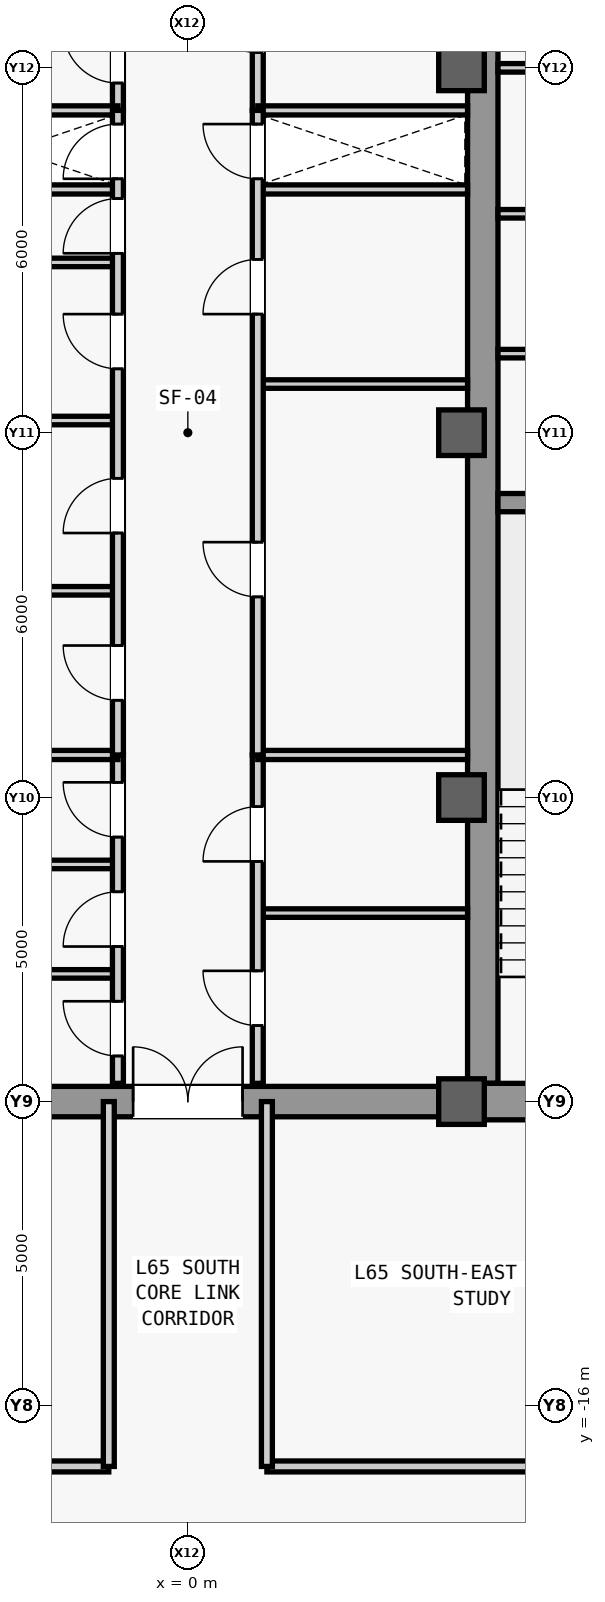
"""IFC4 building model, lengths in metres.
Left out: names, types, materials, properties, quantities, classifications, styles, units other than length and angle.
Written with IfcOpenShell. Run it as: python <this file> out.ifc"""

import sys

from ifc_helpers import new_model, si_unit, direction, frame, frame_2d, origin, origin_2d, place, context, subcontext, project, spatial, rectangle, extrude, source, transform, mapped, element, fill, save


model = new_model("IFC4")
c1 = context("Model", 3, precision=1e-05, world=origin(), true_north=direction((0.0, 1.0)))
c2 = subcontext(c1, "Body", "Model", "MODEL_VIEW")
j1 = project(units=[si_unit("LENGTHUNIT", "METRE"), si_unit("PLANEANGLEUNIT", "RADIAN")], contexts=[c1])
p1 = place(None, origin())
s1 = spatial("IfcSite", under=j1, at=p1, CompositionType="ELEMENT")
p2 = place(p1, origin())
s2 = spatial("IfcBuilding", under=s1, at=p2, CompositionType="ELEMENT")
p3 = place(p2, frame((0.0, 0.0, 277.5)))
s3 = spatial("IfcBuildingStorey", under=s2, at=p3, CompositionType="ELEMENT", Elevation=277.5)
m1 = source(origin(), c2, "Body", "SweptSolid", [
    extrude(rectangle(XDim=21.4, YDim=0.5, at=frame_2d((10.7, 0.0))), origin(), (0.0, 0.0, 1.0), 3.78),
])
p4 = place(p3, frame((4.85, -10.7, 0.0), z_axis=(0.0, 0.0, 1.0), x_axis=(0.0, 1.0, 0.0)))
e1 = element("IfcWall", 1, at=p4, inside=s3, PredefinedType="SHEAR", context=c2, shape_type="MappedRepresentation", body=[
    mapped(m1, transform((0.0, 0.0, 0.0), scale=1.0)),
])
m2 = source(origin(), c2, "Body", "SweptSolid", [
    extrude(rectangle(XDim=5.9, YDim=0.6, at=frame_2d((2.95, 0.0))), origin(), (0.0, 0.0, 1.0), 3.78),
])
p5 = place(p3, frame((4.85, -11.0, 0.0), z_axis=(0.0, 0.0, 1.0), x_axis=(1.0, 0.0, 0.0)))
e2 = element("IfcWall", 2, at=p5, inside=s3, PredefinedType="SHEAR", context=c2, shape_type="MappedRepresentation", body=[
    mapped(m2, transform((0.0, 0.0, 0.0), scale=1.0)),
])
m3 = source(origin(), c2, "Body", "SweptSolid", [
    extrude(rectangle(XDim=5.65, YDim=0.3, at=frame_2d((2.825, 0.0))), origin(), (0.0, 0.0, 1.0), 3.78),
])
p6 = place(p3, frame((5.1, -1.15, 0.0), z_axis=(0.0, 0.0, 1.0), x_axis=(1.0, 0.0, 0.0)))
e3 = element("IfcWall", 3, at=p6, inside=s3, PredefinedType="SHEAR", context=c2, shape_type="MappedRepresentation", body=[
    mapped(m3, transform((0.0, 0.0, 0.0), scale=1.0)),
])
m4 = source(origin(), c2, "Body", "SweptSolid", [
    extrude(rectangle(XDim=9.2, YDim=0.5, at=frame_2d((4.6, 0.0))), origin(), (0.0, 0.0, 1.0), 3.78),
])
p7 = place(p3, frame((-4.6, -11.0, 0.0), z_axis=(0.0, 0.0, 1.0), x_axis=(1.0, 0.0, 0.0)))
e4 = element("IfcWall", 4, at=p7, inside=s3, PredefinedType="SHEAR", context=c2, shape_type="MappedRepresentation", body=[
    mapped(m4, transform((0.0, 0.0, 0.0), scale=1.0)),
])
m5 = source(origin(), c2, "Body", "SweptSolid", [
    extrude(rectangle(XDim=1.8, YDim=2.25, at=frame_2d((0.9, 1.125))), frame((0.0, 0.26, 0.0), z_axis=(0.0, -1.0, 0.0), x_axis=(1.0, 0.0, 0.0)), (0.0, 0.0, 1.0), 0.52),
])
p8 = place(p7, frame((3.7, 0.0, 0.0)))
e5 = element("IfcOpeningElement", 5, at=p8, cuts=e4, PredefinedType="OPENING", context=c2, shape_type="MappedRepresentation", body=[
    mapped(m5, transform((0.0, 0.0, 0.0), scale=1.0)),
])
m6 = source(origin(), c2, "Body", "SweptSolid", [
    extrude(rectangle(XDim=0.75, YDim=0.75, at=origin_2d()), origin(), (0.0, 0.0, 1.0), 4.0),
])
for number, where, z_axis, x_axis in (
    (6, (4.5, -11.0, 0.0), (0.0, 0.0, 1.0), (1.0, 0.0, 0.0)),
    (7, (4.5, -6.0, 0.0), (0.0, 0.0, 1.0), (1.0, 0.0, 0.0)),
    (8, (4.5, 0.0, 0.0), (0.0, 0.0, 1.0), (1.0, 0.0, 0.0)),
    (9, (4.5, 6.0, 0.0), (0.0, 0.0, 1.0), (1.0, 0.0, 0.0)),
):
    element("IfcColumn", number, at=place(p3, frame(where, z_axis=z_axis, x_axis=x_axis)), inside=s3, PredefinedType="COLUMN", context=c2, shape_type="MappedRepresentation", body=[
        mapped(m6, transform((0.0, 0.0, 0.0), scale=1.0)),
    ])
m7 = source(origin(), c2, "Body", "SweptSolid", [
    extrude(rectangle(XDim=3.15, YDim=0.14, at=frame_2d((1.575, 0.0))), origin(), (0.0, 0.0, 1.0), 3.78),
])
p9 = place(p3, frame((5.1, 1.3, 0.0), z_axis=(0.0, 0.0, 1.0), x_axis=(1.0, 0.0, 0.0)))
e10 = element("IfcWall", 10, at=p9, inside=s3, PredefinedType="PARTITIONING", context=c2, shape_type="MappedRepresentation", body=[
    mapped(m7, transform((0.0, 0.0, 0.0), scale=1.0)),
])
p10 = place(p3, frame((5.1, 6.0, 0.0), z_axis=(0.0, 0.0, 1.0), x_axis=(1.0, 0.0, 0.0)))
e11 = element("IfcWall", 11, at=p10, inside=s3, PredefinedType="PARTITIONING", context=c2, shape_type="MappedRepresentation", body=[
    mapped(m7, transform((0.0, 0.0, 0.0), scale=1.0)),
])
m8 = source(origin(), c2, "Body", "SweptSolid", [
    extrude(rectangle(XDim=0.9, YDim=2.15, at=frame_2d((0.45, 1.075))), frame((0.0, 0.08, 0.0), z_axis=(0.0, -1.0, 0.0), x_axis=(1.0, 0.0, 0.0)), (0.0, 0.0, 1.0), 0.16),
])
p11 = place(p10, frame((1.13, 0.0, 0.0)))
e12 = element("IfcOpeningElement", 12, at=p11, cuts=e11, PredefinedType="OPENING", context=c2, shape_type="MappedRepresentation", body=[
    mapped(m8, transform((0.0, 0.0, 0.0), scale=1.0)),
])
p12 = place(p3, frame((5.1, 3.6, 0.0), z_axis=(0.0, 0.0, 1.0), x_axis=(1.0, 0.0, 0.0)))
e13 = element("IfcWall", 13, at=p12, inside=s3, PredefinedType="PARTITIONING", context=c2, shape_type="MappedRepresentation", body=[
    mapped(m7, transform((0.0, 0.0, 0.0), scale=1.0)),
])
p13 = place(p12, frame((1.13, 0.0, 0.0)))
e14 = element("IfcOpeningElement", 14, at=p13, cuts=e13, PredefinedType="OPENING", context=c2, shape_type="MappedRepresentation", body=[
    mapped(m8, transform((0.0, 0.0, 0.0), scale=1.0)),
])
m9 = source(origin(), c2, "Body", "SweptSolid", [
    extrude(rectangle(XDim=3.45, YDim=0.15, at=frame_2d((1.725, 0.0))), origin(), (0.0, 0.0, 1.0), 3.78),
])
for number, where, z_axis, x_axis in (
    (15, (-4.6, 4.0, 0.0), (0.0, 0.0, 1.0), (1.0, 0.0, 0.0)),
    (16, (1.15, 4.0, 0.0), (0.0, 0.0, 1.0), (1.0, 0.0, 0.0)),
):
    element("IfcWall", number, at=place(p3, frame(where, z_axis=z_axis, x_axis=x_axis)), inside=s3, PredefinedType="PARTITIONING", context=c2, shape_type="MappedRepresentation", body=[
        mapped(m9, transform((0.0, 0.0, 0.0), scale=1.0)),
    ])
m10 = source(origin(), c2, "Body", "SweptSolid", [
    extrude(rectangle(XDim=3.45, YDim=0.14, at=frame_2d((1.725, 0.0))), origin(), (0.0, 0.0, 1.0), 3.78),
])
for number, where, z_axis, x_axis in (
    (17, (-4.6, -8.9, 0.0), (0.0, 0.0, 1.0), (1.0, 0.0, 0.0)),
    (18, (-4.6, -7.1, 0.0), (0.0, 0.0, 1.0), (1.0, 0.0, 0.0)),
):
    element("IfcWall", number, at=place(p3, frame(where, z_axis=z_axis, x_axis=x_axis)), inside=s3, PredefinedType="PARTITIONING", context=c2, shape_type="MappedRepresentation", body=[
        mapped(m10, transform((0.0, 0.0, 0.0), scale=1.0)),
    ])
m11 = source(origin(), c2, "Body", "SweptSolid", [
    extrude(rectangle(XDim=5.4, YDim=0.18, at=frame_2d((2.7, 0.0))), origin(), (0.0, 0.0, 1.0), 3.78),
])
p14 = place(p3, frame((-1.15, -10.7, 0.0), z_axis=(0.0, 0.0, 1.0), x_axis=(0.0, 1.0, 0.0)))
e19 = element("IfcWall", 19, at=p14, inside=s3, PredefinedType="PARTITIONING", context=c2, shape_type="MappedRepresentation", body=[
    mapped(m11, transform((0.0, 0.0, 0.0), scale=1.0)),
])
m12 = source(origin(), c2, "Body", "SweptSolid", [
    extrude(rectangle(XDim=0.9, YDim=2.15, at=frame_2d((0.45, 1.075))), frame((0.0, 0.1, 0.0), z_axis=(0.0, -1.0, 0.0), x_axis=(1.0, 0.0, 0.0)), (0.0, 0.0, 1.0), 0.2),
])
p15 = place(p14, frame((0.45, 0.0, 0.0)))
e20 = element("IfcOpeningElement", 20, at=p15, cuts=e19, PredefinedType="OPENING", context=c2, shape_type="MappedRepresentation", body=[
    mapped(m12, transform((0.0, 0.0, 0.0), scale=1.0)),
])
p16 = place(p14, frame((2.25, 0.0, 0.0)))
e21 = element("IfcOpeningElement", 21, at=p16, cuts=e19, PredefinedType="OPENING", context=c2, shape_type="MappedRepresentation", body=[
    mapped(m12, transform((0.0, 0.0, 0.0), scale=1.0)),
])
p17 = place(p14, frame((4.05, 0.0, 0.0)))
e22 = element("IfcOpeningElement", 22, at=p17, cuts=e19, PredefinedType="OPENING", context=c2, shape_type="MappedRepresentation", body=[
    mapped(m12, transform((0.0, 0.0, 0.0), scale=1.0)),
])
p18 = place(p3, frame((1.15, -7.9, 0.0), z_axis=(0.0, 0.0, 1.0), x_axis=(1.0, 0.0, 0.0)))
e23 = element("IfcWall", 23, at=p18, inside=s3, PredefinedType="PARTITIONING", context=c2, shape_type="MappedRepresentation", body=[
    mapped(m10, transform((0.0, 0.0, 0.0), scale=1.0)),
])
p19 = place(p3, frame((1.15, -10.7, 0.0), z_axis=(0.0, 0.0, 1.0), x_axis=(0.0, 1.0, 0.0)))
e24 = element("IfcWall", 24, at=p19, inside=s3, PredefinedType="PARTITIONING", context=c2, shape_type="MappedRepresentation", body=[
    mapped(m11, transform((0.0, 0.0, 0.0), scale=1.0)),
])
p20 = place(p19, frame((0.95, 0.0, 0.0)))
e25 = element("IfcOpeningElement", 25, at=p20, cuts=e24, PredefinedType="OPENING", context=c2, shape_type="MappedRepresentation", body=[
    mapped(m12, transform((0.0, 0.0, 0.0), scale=1.0)),
])
p21 = place(p19, frame((3.65, 0.0, 0.0)))
e26 = element("IfcOpeningElement", 26, at=p21, cuts=e24, PredefinedType="OPENING", context=c2, shape_type="MappedRepresentation", body=[
    mapped(m12, transform((0.0, 0.0, 0.0), scale=1.0)),
])
for number, where, z_axis, x_axis in (
    (27, (-4.6, -5.3, 0.0), (0.0, 0.0, 1.0), (1.0, 0.0, 0.0)),
    (28, (1.15, -5.3, 0.0), (0.0, 0.0, 1.0), (1.0, 0.0, 0.0)),
):
    element("IfcWall", number, at=place(p3, frame(where, z_axis=z_axis, x_axis=x_axis)), inside=s3, PredefinedType="PARTITIONING", context=c2, shape_type="MappedRepresentation", body=[
        mapped(m9, transform((0.0, 0.0, 0.0), scale=1.0)),
    ])
p22 = place(p3, frame((-1.15, 5.3, 0.0), z_axis=(0.0, 0.0, 1.0), x_axis=(0.0, 1.0, 0.0)))
e29 = element("IfcWall", 29, at=p22, inside=s3, PredefinedType="PARTITIONING", context=c2, shape_type="MappedRepresentation", body=[
    mapped(m11, transform((0.0, 0.0, 0.0), scale=1.0)),
])
p23 = place(p22, frame((0.45, 0.0, 0.0)))
e30 = element("IfcOpeningElement", 30, at=p23, cuts=e29, PredefinedType="OPENING", context=c2, shape_type="MappedRepresentation", body=[
    mapped(m12, transform((0.0, 0.0, 0.0), scale=1.0)),
])
p24 = place(p22, frame((2.25, 0.0, 0.0)))
e31 = element("IfcOpeningElement", 31, at=p24, cuts=e29, PredefinedType="OPENING", context=c2, shape_type="MappedRepresentation", body=[
    mapped(m12, transform((0.0, 0.0, 0.0), scale=1.0)),
])
p25 = place(p22, frame((4.05, 0.0, 0.0)))
e32 = element("IfcOpeningElement", 32, at=p25, cuts=e29, PredefinedType="OPENING", context=c2, shape_type="MappedRepresentation", body=[
    mapped(m12, transform((0.0, 0.0, 0.0), scale=1.0)),
])
p26 = place(p3, frame((1.15, 5.3, 0.0), z_axis=(0.0, 0.0, 1.0), x_axis=(0.0, 1.0, 0.0)))
e33 = element("IfcWall", 33, at=p26, inside=s3, PredefinedType="PARTITIONING", context=c2, shape_type="MappedRepresentation", body=[
    mapped(m11, transform((0.0, 0.0, 0.0), scale=1.0)),
])
p27 = place(p26, frame((0.95, 0.0, 0.0)))
e34 = element("IfcOpeningElement", 34, at=p27, cuts=e33, PredefinedType="OPENING", context=c2, shape_type="MappedRepresentation", body=[
    mapped(m12, transform((0.0, 0.0, 0.0), scale=1.0)),
])
p28 = place(p26, frame((3.65, 0.0, 0.0)))
e35 = element("IfcOpeningElement", 35, at=p28, cuts=e33, PredefinedType="OPENING", context=c2, shape_type="MappedRepresentation", body=[
    mapped(m12, transform((0.0, 0.0, 0.0), scale=1.0)),
])
for number, where, z_axis, x_axis in (
    (36, (-4.6, 5.3, 0.0), (0.0, 0.0, 1.0), (1.0, 0.0, 0.0)),
    (37, (1.15, 5.3, 0.0), (0.0, 0.0, 1.0), (1.0, 0.0, 0.0)),
):
    element("IfcWall", number, at=place(p3, frame(where, z_axis=z_axis, x_axis=x_axis)), inside=s3, PredefinedType="PARTITIONING", context=c2, shape_type="MappedRepresentation", body=[
        mapped(m9, transform((0.0, 0.0, 0.0), scale=1.0)),
    ])
p29 = place(p3, frame((-4.6, -2.6, 0.0), z_axis=(0.0, 0.0, 1.0), x_axis=(1.0, 0.0, 0.0)))
e38 = element("IfcWall", 38, at=p29, inside=s3, PredefinedType="PARTITIONING", context=c2, shape_type="MappedRepresentation", body=[
    mapped(m10, transform((0.0, 0.0, 0.0), scale=1.0)),
])
m13 = source(origin(), c2, "Body", "SweptSolid", [
    extrude(rectangle(XDim=3.45, YDim=0.14, at=frame_2d((1.725, 0.0))), origin(), (0.0, 0.0, 1.0), 3.085),
])
p30 = place(p3, frame((-4.6, 0.2, 0.0), z_axis=(0.0, 0.0, 1.0), x_axis=(1.0, 0.0, 0.0)))
e39 = element("IfcWall", 39, at=p30, inside=s3, PredefinedType="PARTITIONING", context=c2, shape_type="MappedRepresentation", body=[
    mapped(m13, transform((0.0, 0.0, 0.0), scale=1.0)),
])
p31 = place(p3, frame((-4.6, 2.8, 0.0), z_axis=(0.0, 0.0, 1.0), x_axis=(1.0, 0.0, 0.0)))
e40 = element("IfcWall", 40, at=p31, inside=s3, PredefinedType="PARTITIONING", context=c2, shape_type="MappedRepresentation", body=[
    mapped(m10, transform((0.0, 0.0, 0.0), scale=1.0)),
])
m14 = source(origin(), c2, "Body", "SweptSolid", [
    extrude(rectangle(XDim=10.6, YDim=0.18, at=frame_2d((5.3, 0.0))), origin(), (0.0, 0.0, 1.0), 3.78),
])
p32 = place(p3, frame((-1.15, -5.3, 0.0), z_axis=(0.0, 0.0, 1.0), x_axis=(0.0, 1.0, 0.0)))
e41 = element("IfcWall", 41, at=p32, inside=s3, PredefinedType="PARTITIONING", context=c2, shape_type="MappedRepresentation", body=[
    mapped(m14, transform((0.0, 0.0, 0.0), scale=1.0)),
])
p33 = place(p32, frame((0.9, 0.0, 0.0)))
e42 = element("IfcOpeningElement", 42, at=p33, cuts=e41, PredefinedType="OPENING", context=c2, shape_type="MappedRepresentation", body=[
    mapped(m12, transform((0.0, 0.0, 0.0), scale=1.0)),
])
p34 = place(p32, frame((3.65, 0.0, 0.0)))
e43 = element("IfcOpeningElement", 43, at=p34, cuts=e41, PredefinedType="OPENING", context=c2, shape_type="MappedRepresentation", body=[
    mapped(m12, transform((0.0, 0.0, 0.0), scale=1.0)),
])
p35 = place(p32, frame((6.35, 0.0, 0.0)))
e44 = element("IfcOpeningElement", 44, at=p35, cuts=e41, PredefinedType="OPENING", context=c2, shape_type="MappedRepresentation", body=[
    mapped(m12, transform((0.0, 0.0, 0.0), scale=1.0)),
])
p36 = place(p32, frame((8.25, 0.0, 0.0)))
e45 = element("IfcOpeningElement", 45, at=p36, cuts=e41, PredefinedType="OPENING", context=c2, shape_type="MappedRepresentation", body=[
    mapped(m12, transform((0.0, 0.0, 0.0), scale=1.0)),
])
p37 = place(p32, frame((9.475, 0.0, 0.0)))
e46 = element("IfcOpeningElement", 46, at=p37, cuts=e41, PredefinedType="OPENING", context=c2, shape_type="MappedRepresentation", body=[
    mapped(m12, transform((0.0, 0.0, 0.0), scale=1.0)),
])
p38 = place(p3, frame((1.15, 0.8, 0.0), z_axis=(0.0, 0.0, 1.0), x_axis=(1.0, 0.0, 0.0)))
e47 = element("IfcWall", 47, at=p38, inside=s3, PredefinedType="PARTITIONING", context=c2, shape_type="MappedRepresentation", body=[
    mapped(m10, transform((0.0, 0.0, 0.0), scale=1.0)),
])
p39 = place(p3, frame((1.15, -5.3, 0.0), z_axis=(0.0, 0.0, 1.0), x_axis=(0.0, 1.0, 0.0)))
e48 = element("IfcWall", 48, at=p39, inside=s3, PredefinedType="PARTITIONING", context=c2, shape_type="MappedRepresentation", body=[
    mapped(m14, transform((0.0, 0.0, 0.0), scale=1.0)),
])
p40 = place(p39, frame((2.6, 0.0, 0.0)))
e49 = element("IfcOpeningElement", 49, at=p40, cuts=e48, PredefinedType="OPENING", context=c2, shape_type="MappedRepresentation", body=[
    mapped(m12, transform((0.0, 0.0, 0.0), scale=1.0)),
])
p41 = place(p39, frame((7.25, 0.0, 0.0)))
e50 = element("IfcOpeningElement", 50, at=p41, cuts=e48, PredefinedType="OPENING", context=c2, shape_type="MappedRepresentation", body=[
    mapped(m12, transform((0.0, 0.0, 0.0), scale=1.0)),
])
p42 = place(p39, frame((9.475, 0.0, 0.0)))
e51 = element("IfcOpeningElement", 51, at=p42, cuts=e48, PredefinedType="OPENING", context=c2, shape_type="MappedRepresentation", body=[
    mapped(m12, transform((0.0, 0.0, 0.0), scale=1.0)),
])
m15 = source(origin(), c2, "Body", "SweptSolid", [
    extrude(rectangle(XDim=16.1, YDim=0.18, at=frame_2d((8.05, 0.0))), origin(), (0.0, 0.0, 1.0), 3.78),
])
p43 = place(p3, frame((-17.4, -17.0, 0.0), z_axis=(0.0, 0.0, 1.0), x_axis=(1.0, 0.0, 0.0)))
e52 = element("IfcWall", 52, at=p43, inside=s3, PredefinedType="PARTITIONING", context=c2, shape_type="MappedRepresentation", body=[
    mapped(m15, transform((0.0, 0.0, 0.0), scale=1.0)),
])
p44 = place(p43, frame((8.95, 0.0, 0.0)))
e53 = element("IfcOpeningElement", 53, at=p44, cuts=e52, PredefinedType="OPENING", context=c2, shape_type="MappedRepresentation", body=[
    mapped(m12, transform((0.0, 0.0, 0.0), scale=1.0)),
])
m16 = source(origin(), c2, "Body", "SweptSolid", [
    extrude(rectangle(XDim=6.0, YDim=0.18, at=frame_2d((3.0, 0.0))), origin(), (0.0, 0.0, 1.0), 3.78),
])
p45 = place(p3, frame((-1.3, -17.0, 0.0), z_axis=(0.0, 0.0, 1.0), x_axis=(0.0, 1.0, 0.0)))
e54 = element("IfcWall", 54, at=p45, inside=s3, PredefinedType="PARTITIONING", context=c2, shape_type="MappedRepresentation", body=[
    mapped(m16, transform((0.0, 0.0, 0.0), scale=1.0)),
])
m17 = source(origin(), c2, "Body", "SweptSolid", [
    extrude(rectangle(XDim=14.05, YDim=0.18, at=frame_2d((7.025, 0.0))), origin(), (0.0, 0.0, 1.0), 3.78),
])
p46 = place(p3, frame((1.3, -17.0, 0.0), z_axis=(0.0, 0.0, 1.0), x_axis=(1.0, 0.0, 0.0)))
e55 = element("IfcWall", 55, at=p46, inside=s3, PredefinedType="PARTITIONING", context=c2, shape_type="MappedRepresentation", body=[
    mapped(m17, transform((0.0, 0.0, 0.0), scale=1.0)),
])
p47 = place(p46, frame((6.25, 0.0, 0.0)))
e56 = element("IfcOpeningElement", 56, at=p47, cuts=e55, PredefinedType="OPENING", context=c2, shape_type="MappedRepresentation", body=[
    mapped(m12, transform((0.0, 0.0, 0.0), scale=1.0)),
])
p48 = place(p3, frame((1.3, -17.0, 0.0), z_axis=(0.0, 0.0, 1.0), x_axis=(0.0, 1.0, 0.0)))
e57 = element("IfcWall", 57, at=p48, inside=s3, PredefinedType="PARTITIONING", context=c2, shape_type="MappedRepresentation", body=[
    mapped(m16, transform((0.0, 0.0, 0.0), scale=1.0)),
])
m18 = source(origin(), c2, "Body", "SweptSolid", [
    extrude(rectangle(XDim=0.9, YDim=2.15, at=frame_2d((0.45, 1.075))), frame((0.0, 0.025, 0.0), z_axis=(0.0, -1.0, 0.0), x_axis=(1.0, 0.0, 0.0)), (0.0, 0.0, 1.0), 0.05),
])
p49 = place(p15, origin())
e58 = element("IfcDoor", 58, at=p49, inside=s3, OperationType="SINGLE_SWING_RIGHT", PredefinedType="DOOR", context=c2, shape_type="MappedRepresentation", body=[
    mapped(m18, transform((0.0, 0.0, 0.0), scale=1.0)),
])
fill(e20, e58)
p50 = place(p16, origin())
e59 = element("IfcDoor", 59, at=p50, inside=s3, OperationType="SINGLE_SWING_LEFT", PredefinedType="DOOR", context=c2, shape_type="MappedRepresentation", body=[
    mapped(m18, transform((0.0, 0.0, 0.0), scale=1.0)),
])
fill(e21, e59)
p51 = place(p17, origin())
e60 = element("IfcDoor", 60, at=p51, inside=s3, OperationType="SINGLE_SWING_RIGHT", PredefinedType="DOOR", context=c2, shape_type="MappedRepresentation", body=[
    mapped(m18, transform((0.0, 0.0, 0.0), scale=1.0)),
])
fill(e22, e60)
p52 = place(p20, origin())
e61 = element("IfcDoor", 61, at=p52, inside=s3, OperationType="SINGLE_SWING_RIGHT", PredefinedType="DOOR", context=c2, shape_type="MappedRepresentation", body=[
    mapped(m18, transform((0.0, 0.0, 0.0), scale=1.0)),
])
fill(e25, e61)
p53 = place(p21, origin())
e62 = element("IfcDoor", 62, at=p53, inside=s3, OperationType="SINGLE_SWING_LEFT", PredefinedType="DOOR", context=c2, shape_type="MappedRepresentation", body=[
    mapped(m18, transform((0.0, 0.0, 0.0), scale=1.0)),
])
fill(e26, e62)
m19 = source(origin(), c2, "Body", "SweptSolid", [
    extrude(rectangle(XDim=1.8, YDim=2.25, at=frame_2d((0.9, 1.125))), frame((0.0, 0.025, 0.0), z_axis=(0.0, -1.0, 0.0), x_axis=(1.0, 0.0, 0.0)), (0.0, 0.0, 1.0), 0.05),
])
p54 = place(p8, origin())
e63 = element("IfcDoor", 63, at=p54, inside=s3, OperationType="SINGLE_SWING_LEFT", PredefinedType="DOOR", context=c2, shape_type="MappedRepresentation", body=[
    mapped(m19, transform((0.0, 0.0, 0.0), scale=1.0)),
])
fill(e5, e63)
p55 = place(p23, origin())
e64 = element("IfcDoor", 64, at=p55, inside=s3, OperationType="SINGLE_SWING_RIGHT", PredefinedType="DOOR", context=c2, shape_type="MappedRepresentation", body=[
    mapped(m18, transform((0.0, 0.0, 0.0), scale=1.0)),
])
fill(e30, e64)
p56 = place(p27, origin())
e65 = element("IfcDoor", 65, at=p56, inside=s3, OperationType="SINGLE_SWING_RIGHT", PredefinedType="DOOR", context=c2, shape_type="MappedRepresentation", body=[
    mapped(m18, transform((0.0, 0.0, 0.0), scale=1.0)),
])
fill(e34, e65)
p57 = place(p33, origin())
e66 = element("IfcDoor", 66, at=p57, inside=s3, OperationType="SINGLE_SWING_RIGHT", PredefinedType="DOOR", context=c2, shape_type="MappedRepresentation", body=[
    mapped(m18, transform((0.0, 0.0, 0.0), scale=1.0)),
])
fill(e42, e66)
p58 = place(p34, origin())
e67 = element("IfcDoor", 67, at=p58, inside=s3, OperationType="SINGLE_SWING_LEFT", PredefinedType="DOOR", context=c2, shape_type="MappedRepresentation", body=[
    mapped(m18, transform((0.0, 0.0, 0.0), scale=1.0)),
])
fill(e43, e67)
p59 = place(p35, origin())
e68 = element("IfcDoor", 68, at=p59, inside=s3, OperationType="SINGLE_SWING_RIGHT", PredefinedType="DOOR", context=c2, shape_type="MappedRepresentation", body=[
    mapped(m18, transform((0.0, 0.0, 0.0), scale=1.0)),
])
fill(e44, e68)
p60 = place(p36, origin())
e69 = element("IfcDoor", 69, at=p60, inside=s3, OperationType="SINGLE_SWING_LEFT", PredefinedType="DOOR", context=c2, shape_type="MappedRepresentation", body=[
    mapped(m18, transform((0.0, 0.0, 0.0), scale=1.0)),
])
fill(e45, e69)
p61 = place(p40, origin())
e70 = element("IfcDoor", 70, at=p61, inside=s3, OperationType="SINGLE_SWING_RIGHT", PredefinedType="DOOR", context=c2, shape_type="MappedRepresentation", body=[
    mapped(m18, transform((0.0, 0.0, 0.0), scale=1.0)),
])
fill(e49, e70)
p62 = place(p41, origin())
e71 = element("IfcDoor", 71, at=p62, inside=s3, OperationType="SINGLE_SWING_LEFT", PredefinedType="DOOR", context=c2, shape_type="MappedRepresentation", body=[
    mapped(m18, transform((0.0, 0.0, 0.0), scale=1.0)),
])
fill(e50, e71)
p63 = place(p37, origin())
e72 = element("IfcDoor", 72, at=p63, inside=s3, OperationType="SINGLE_SWING_LEFT", PredefinedType="DOOR", context=c2, shape_type="MappedRepresentation", body=[
    mapped(m18, transform((0.0, 0.0, 0.0), scale=1.0)),
])
fill(e46, e72)
p64 = place(p42, origin())
e73 = element("IfcDoor", 73, at=p64, inside=s3, OperationType="SINGLE_SWING_RIGHT", PredefinedType="DOOR", context=c2, shape_type="MappedRepresentation", body=[
    mapped(m18, transform((0.0, 0.0, 0.0), scale=1.0)),
])
fill(e51, e73)
save(model, sys.argv[1])
